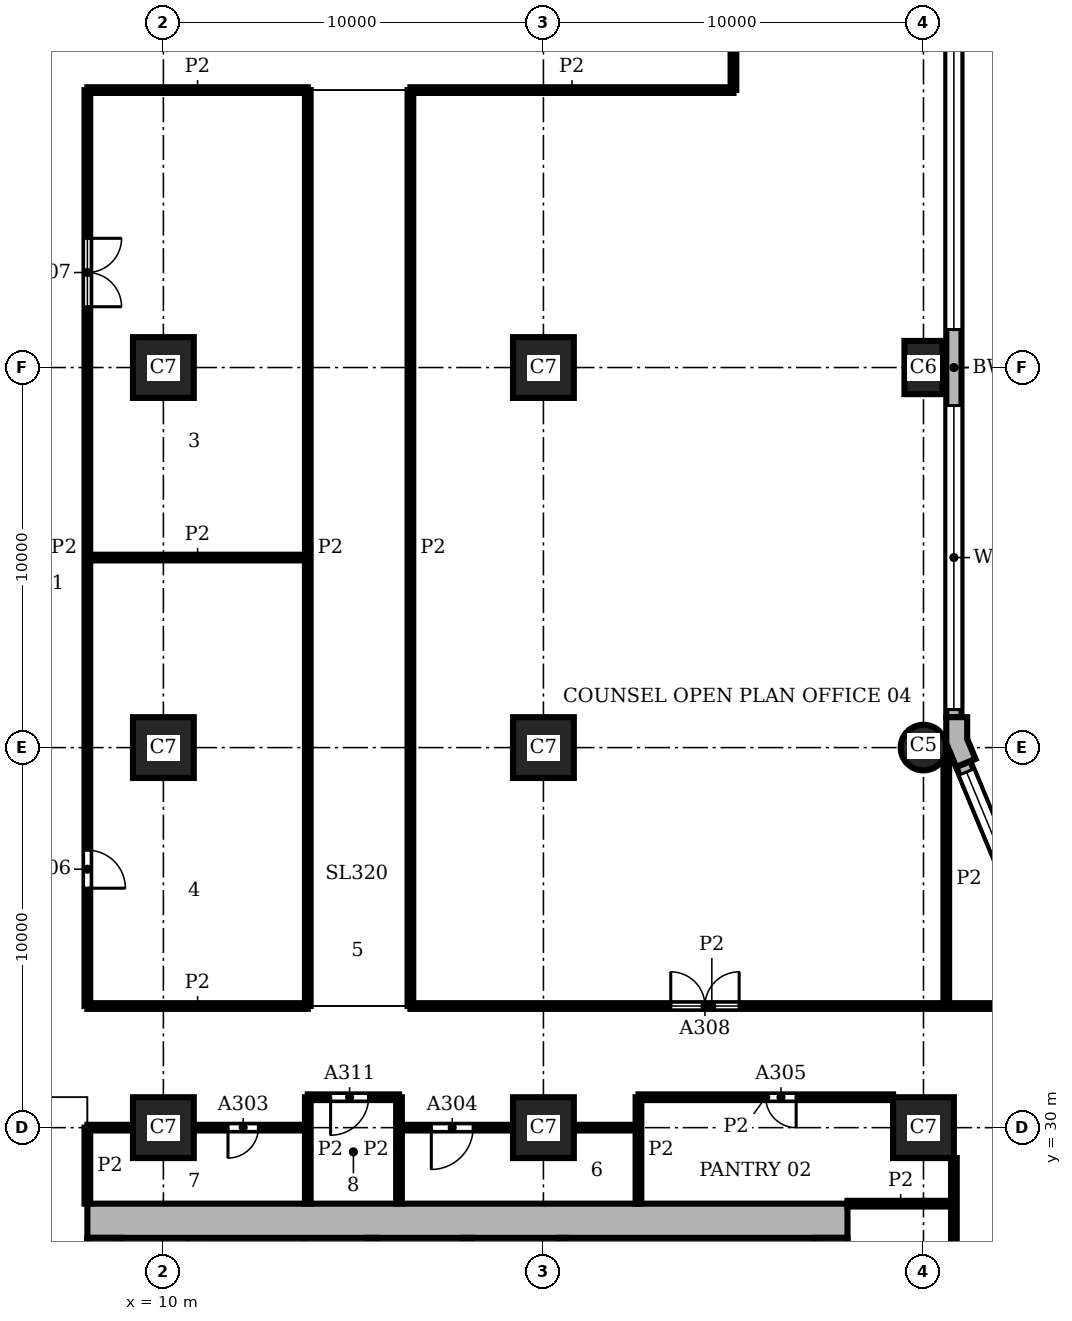
"""IFC4 building model, lengths in metres.
Left out: names, types, materials, properties, quantities, classifications, styles, units other than length and angle.
Written with IfcOpenShell. Run it as: python <this file> out.ifc"""

import sys

from ifc_helpers import new_model, si_unit, direction, frame, frame_2d, origin, origin_2d, place, context, subcontext, project, spatial, polyline, rectangle, circle, outline, extrude, element, fill, save


model = new_model("IFC4")
c1 = context("Model", 3, precision=1e-05, world=origin(), true_north=direction((0.0, 1.0)))
c2 = subcontext(c1, "Body", "Model", "MODEL_VIEW")
j1 = project(units=[si_unit("LENGTHUNIT", "METRE"), si_unit("PLANEANGLEUNIT", "RADIAN")], contexts=[c1])
p1 = place(None, origin())
s1 = spatial("IfcSite", under=j1, at=p1, CompositionType="ELEMENT")
p2 = place(p1, origin())
s2 = spatial("IfcBuilding", under=s1, at=p2, CompositionType="ELEMENT")
p3 = place(p2, frame((0.0, 0.0, 43.2)))
s3 = spatial("IfcBuildingStorey", under=s2, at=p3, CompositionType="ELEMENT", Elevation=43.2)
p4 = place(p3, frame((30.0, 40.0, 0.0), z_axis=(0.0, 0.0, 1.0), x_axis=(1.0, 0.0, 0.0)))
e1 = element("IfcColumn", 1, at=p4, inside=s3, PredefinedType="COLUMN", context=c2, shape_type="SweptSolid", body=[
    extrude(circle(Radius=0.6, at=origin_2d()), origin(), (0.0, 0.0, 1.0), 3.9),
])
p5 = place(p3, frame((30.0, 50.0, 0.0), z_axis=(0.0, 0.0, 1.0), x_axis=(0.0, 1.0, 0.0)))
e2 = element("IfcColumn", 2, at=p5, inside=s3, PredefinedType="COLUMN", context=c2, shape_type="SweptSolid", body=[
    extrude(rectangle(XDim=1.4, YDim=1.0, at=origin_2d()), origin(), (0.0, 0.0, 1.0), 3.9),
])
for number, where, z_axis, x_axis in (
    (3, (10.0, 30.0, 0.0), (0.0, 0.0, 1.0), (1.0, 0.0, 0.0)),
    (4, (10.0, 40.0, 0.0), (0.0, 0.0, 1.0), (1.0, 0.0, 0.0)),
    (5, (10.0, 50.0, 0.0), (0.0, 0.0, 1.0), (1.0, 0.0, 0.0)),
    (6, (20.0, 30.0, 0.0), (0.0, 0.0, 1.0), (1.0, 0.0, 0.0)),
    (7, (20.0, 40.0, 0.0), (0.0, 0.0, 1.0), (1.0, 0.0, 0.0)),
    (8, (20.0, 50.0, 0.0), (0.0, 0.0, 1.0), (1.0, 0.0, 0.0)),
    (9, (30.0, 30.0, 0.0), (0.0, 0.0, 1.0), (1.0, 0.0, 0.0)),
):
    element("IfcColumn", number, at=place(p3, frame(where, z_axis=z_axis, x_axis=x_axis)), inside=s3, PredefinedType="COLUMN", context=c2, shape_type="SweptSolid", body=[
        extrude(rectangle(XDim=1.6, YDim=1.6, at=origin_2d()), origin(), (0.0, 0.0, 1.0), 3.9),
    ])
p6 = place(p3, frame((27.55, 8.9, 0.0), z_axis=(0.0, 0.0, 1.0), x_axis=(0.0, 1.0, 0.0)))
e10 = element("IfcWall", 10, at=p6, inside=s3, PredefinedType="SHEAR", context=c2, shape_type="SweptSolid", body=[
    extrude(rectangle(XDim=18.2, YDim=0.9, at=frame_2d((9.1, 0.0))), origin(), (0.0, 0.0, 1.0), 3.9),
])
p7 = place(p6, frame((4.55, 0.0, 0.0)))
e11 = element("IfcOpeningElement", 11, at=p7, cuts=e10, PredefinedType="OPENING", context=c2, shape_type="SweptSolid", body=[
    extrude(rectangle(XDim=1.6, YDim=2.1, at=frame_2d((0.8, 1.05))), frame((0.0, 0.46, 0.0), z_axis=(0.0, -1.0, 0.0), x_axis=(1.0, 0.0, 0.0)), (0.0, 0.0, 1.0), 0.92),
])
p8 = place(p3, frame((28.0, 27.55, 0.0), z_axis=(0.0, 0.0, 1.0), x_axis=(-1.0, 0.0, 0.0)))
e12 = element("IfcWall", 12, at=p8, inside=s3, PredefinedType="SHEAR", context=c2, shape_type="SweptSolid", body=[
    extrude(rectangle(XDim=20.0, YDim=0.9, at=frame_2d((10.0, 0.0))), origin(), (0.0, 0.0, 1.0), 3.9),
])
p9 = place(p3, frame((8.45, 27.1, 0.0), z_axis=(0.0, 0.0, 1.0), x_axis=(0.0, -1.0, 0.0)))
e13 = element("IfcWall", 13, at=p9, inside=s3, PredefinedType="SHEAR", context=c2, shape_type="SweptSolid", body=[
    extrude(rectangle(XDim=18.2, YDim=0.9, at=frame_2d((9.1, 0.0))), origin(), (0.0, 0.0, 1.0), 3.9),
])
p10 = place(p3, origin())
e14 = element("IfcWall", 14, at=p10, inside=s3, PredefinedType="SOLIDWALL", context=c2, shape_type="SweptSolid", body=[
    extrude(outline(polyline([(31.23, 39.644), (31.369, 39.701), (31.15, 40.229), (31.15, 40.8), (31.0, 40.8), (30.6, 40.8), (30.6, 40.119), (30.861, 39.49), (31.23, 39.644)])), origin(), (0.0, 0.0, 1.0), 3.9),
])
p11 = place(p3, frame((33.362, 33.974, 0.0), z_axis=(0.0, 0.0, 1.0), x_axis=(-0.382655745237, 0.923891000409, 0.0)))
e15 = element("IfcWall", 15, at=p11, inside=s3, PredefinedType="SOLIDWALL", context=c2, shape_type="SweptSolid", body=[
    extrude(rectangle(XDim=6.053, YDim=0.4, at=frame_2d((3.027, 0.0))), origin(), (0.0, 0.0, 1.0), 3.9),
])
p12 = place(p11, frame((0.227, 0.0, 0.9)))
e16 = element("IfcOpeningElement", 16, at=p12, cuts=e15, PredefinedType="OPENING", context=c2, shape_type="SweptSolid", body=[
    extrude(rectangle(XDim=5.6, YDim=2.35, at=frame_2d((2.8, 1.175))), frame((0.0, 0.21, 0.0), z_axis=(0.0, -1.0, 0.0), x_axis=(1.0, 0.0, 0.0)), (0.0, 0.0, 1.0), 0.42),
])
p13 = place(p3, frame((30.8, 40.8, 0.0), z_axis=(0.0, 0.0, 1.0), x_axis=(0.0, 1.0, 0.0)))
e17 = element("IfcWall", 17, at=p13, inside=s3, PredefinedType="SOLIDWALL", context=c2, shape_type="SweptSolid", body=[
    extrude(rectangle(XDim=18.4, YDim=0.4, at=frame_2d((9.2, 0.0))), origin(), (0.0, 0.0, 1.0), 3.9),
])
p14 = place(p13, frame((0.2, 0.0, 0.9)))
e18 = element("IfcOpeningElement", 18, at=p14, cuts=e17, PredefinedType="OPENING", context=c2, shape_type="SweptSolid", body=[
    extrude(rectangle(XDim=8.0, YDim=2.35, at=frame_2d((4.0, 1.175))), frame((0.0, 0.21, 0.0), z_axis=(0.0, -1.0, 0.0), x_axis=(1.0, 0.0, 0.0)), (0.0, 0.0, 1.0), 0.42),
])
p15 = place(p13, frame((10.2, 0.0, 0.9)))
e19 = element("IfcOpeningElement", 19, at=p15, cuts=e17, PredefinedType="OPENING", context=c2, shape_type="SweptSolid", body=[
    extrude(rectangle(XDim=8.0, YDim=2.35, at=frame_2d((4.0, 1.175))), frame((0.0, 0.21, 0.0), z_axis=(0.0, -1.0, 0.0), x_axis=(1.0, 0.0, 0.0)), (0.0, 0.0, 1.0), 0.42),
])
p16 = place(p3, frame((15.5, 23.6, 0.0), z_axis=(0.0, 0.0, 1.0), x_axis=(0.0, 1.0, 0.0)))
e20 = element("IfcWall", 20, at=p16, inside=s3, PredefinedType="SHEAR", context=c2, shape_type="SweptSolid", body=[
    extrude(rectangle(XDim=3.5, YDim=0.2, at=frame_2d((1.75, 0.0))), origin(), (0.0, 0.0, 1.0), 3.58),
])
p17 = place(p3, frame((18.0, 20.0, 0.0), z_axis=(0.0, 0.0, 1.0), x_axis=(0.0, 1.0, 0.0)))
e21 = element("IfcWall", 21, at=p17, inside=s3, PredefinedType="SHEAR", context=c2, shape_type="SweptSolid", body=[
    extrude(rectangle(XDim=7.1, YDim=0.2, at=frame_2d((3.55, 0.0))), origin(), (0.0, 0.0, 1.0), 3.58),
])
p18 = place(p17, frame((1.2, 0.0, 0.0)))
e22 = element("IfcOpeningElement", 22, at=p18, cuts=e21, PredefinedType="OPENING", context=c2, shape_type="SweptSolid", body=[
    extrude(rectangle(XDim=1.2, YDim=2.1, at=frame_2d((0.6, 1.05))), frame((0.0, 0.11, 0.0), z_axis=(0.0, -1.0, 0.0), x_axis=(1.0, 0.0, 0.0)), (0.0, 0.0, 1.0), 0.22),
])
p19 = place(p3, frame((20.5, 23.6, 0.0), z_axis=(0.0, 0.0, 1.0), x_axis=(0.0, 1.0, 0.0)))
e23 = element("IfcWall", 23, at=p19, inside=s3, PredefinedType="SHEAR", context=c2, shape_type="SweptSolid", body=[
    extrude(rectangle(XDim=3.5, YDim=0.2, at=frame_2d((1.75, 0.0))), origin(), (0.0, 0.0, 1.0), 3.58),
])
p20 = place(p3, frame((8.0, 28.0, 0.0), z_axis=(0.0, 0.0, 1.0), x_axis=(0.0, 1.0, 0.0)))
e24 = element("IfcWall", 24, at=p20, inside=s3, PredefinedType="PARTITIONING", context=c2, shape_type="SweptSolid", body=[
    extrude(rectangle(XDim=2.0, YDim=0.15, at=frame_2d((1.0, 0.0))), origin(), (0.0, 0.0, 1.0), 3.58),
])
p21 = place(p3, frame((8.0, 33.2, 0.0), z_axis=(0.0, 0.0, 1.0), x_axis=(0.0, 1.0, 0.0)))
e25 = element("IfcWall", 25, at=p21, inside=s3, PredefinedType="PARTITIONING", context=c2, shape_type="SweptSolid", body=[
    extrude(rectangle(XDim=24.1, YDim=0.15, at=frame_2d((12.05, 0.0))), origin(), (0.0, 0.0, 1.0), 3.58),
])
p22 = place(p21, frame((3.1, 0.0, 0.0)))
e26 = element("IfcOpeningElement", 26, at=p22, cuts=e25, PredefinedType="OPENING", context=c2, shape_type="SweptSolid", body=[
    extrude(rectangle(XDim=1.0, YDim=2.1, at=frame_2d((0.5, 1.05))), frame((0.0, 0.085, 0.0), z_axis=(0.0, -1.0, 0.0), x_axis=(1.0, 0.0, 0.0)), (0.0, 0.0, 1.0), 0.17),
])
p23 = place(p21, frame((18.4, 0.0, 0.0)))
e27 = element("IfcOpeningElement", 27, at=p23, cuts=e25, PredefinedType="OPENING", context=c2, shape_type="SweptSolid", body=[
    extrude(rectangle(XDim=1.8, YDim=2.1, at=frame_2d((0.9, 1.05))), frame((0.0, 0.085, 0.0), z_axis=(0.0, -1.0, 0.0), x_axis=(1.0, 0.0, 0.0)), (0.0, 0.0, 1.0), 0.17),
])
p24 = place(p3, frame((13.8, 28.0, 0.0), z_axis=(0.0, 0.0, 1.0), x_axis=(0.0, 1.0, 0.0)))
e28 = element("IfcWall", 28, at=p24, inside=s3, PredefinedType="PARTITIONING", context=c2, shape_type="SweptSolid", body=[
    extrude(rectangle(XDim=2.8, YDim=0.15, at=frame_2d((1.4, 0.0))), origin(), (0.0, 0.0, 1.0), 3.58),
])
p25 = place(p3, frame((13.8, 33.2, 0.0), z_axis=(0.0, 0.0, 1.0), x_axis=(0.0, 1.0, 0.0)))
e29 = element("IfcWall", 29, at=p25, inside=s3, PredefinedType="PARTITIONING", context=c2, shape_type="SweptSolid", body=[
    extrude(rectangle(XDim=24.1, YDim=0.15, at=frame_2d((12.05, 0.0))), origin(), (0.0, 0.0, 1.0), 3.58),
])
p26 = place(p3, frame((16.2, 28.0, 0.0), z_axis=(0.0, 0.0, 1.0), x_axis=(0.0, 1.0, 0.0)))
e30 = element("IfcWall", 30, at=p26, inside=s3, PredefinedType="PARTITIONING", context=c2, shape_type="SweptSolid", body=[
    extrude(rectangle(XDim=2.8, YDim=0.15, at=frame_2d((1.4, 0.0))), origin(), (0.0, 0.0, 1.0), 3.58),
])
p27 = place(p3, frame((16.5, 33.2, 0.0), z_axis=(0.0, 0.0, 1.0), x_axis=(0.0, 1.0, 0.0)))
e31 = element("IfcWall", 31, at=p27, inside=s3, PredefinedType="PARTITIONING", context=c2, shape_type="SweptSolid", body=[
    extrude(rectangle(XDim=24.1, YDim=0.15, at=frame_2d((12.05, 0.0))), origin(), (0.0, 0.0, 1.0), 3.58),
])
p28 = place(p3, frame((22.5, 28.0, 0.0), z_axis=(0.0, 0.0, 1.0), x_axis=(0.0, 1.0, 0.0)))
e32 = element("IfcWall", 32, at=p28, inside=s3, PredefinedType="PARTITIONING", context=c2, shape_type="SweptSolid", body=[
    extrude(rectangle(XDim=2.8, YDim=0.15, at=frame_2d((1.4, 0.0))), origin(), (0.0, 0.0, 1.0), 3.58),
])
p29 = place(p3, frame((25.0, 57.3, 0.0), z_axis=(0.0, 0.0, 1.0), x_axis=(0.0, 1.0, 0.0)))
e33 = element("IfcWall", 33, at=p29, inside=s3, PredefinedType="PARTITIONING", context=c2, shape_type="SweptSolid", body=[
    extrude(rectangle(XDim=2.7, YDim=0.15, at=frame_2d((1.35, 0.0))), origin(), (0.0, 0.0, 1.0), 3.58),
])
p30 = place(p3, frame((30.6, 33.2, 0.0), z_axis=(0.0, 0.0, 1.0), x_axis=(0.0, 1.0, 0.0)))
e34 = element("IfcWall", 34, at=p30, inside=s3, PredefinedType="PARTITIONING", context=c2, shape_type="SweptSolid", body=[
    extrude(rectangle(XDim=6.699, YDim=0.15, at=frame_2d((3.35, 0.0))), origin(), (0.0, 0.0, 1.0), 3.58),
])
p31 = place(p3, frame((30.8, 20.8, 0.0), z_axis=(0.0, 0.0, 1.0), x_axis=(0.0, 1.0, 0.0)))
e35 = element("IfcWall", 35, at=p31, inside=s3, PredefinedType="PARTITIONING", context=c2, shape_type="SweptSolid", body=[
    extrude(rectangle(XDim=8.4, YDim=0.15, at=frame_2d((4.2, 0.0))), origin(), (0.0, 0.0, 1.0), 3.58),
])
p32 = place(p31, frame((3.3, 0.0, 0.0)))
e36 = element("IfcOpeningElement", 36, at=p32, cuts=e35, PredefinedType="OPENING", context=c2, shape_type="SweptSolid", body=[
    extrude(rectangle(XDim=1.1, YDim=2.1, at=frame_2d((0.55, 1.05))), frame((0.0, 0.085, 0.0), z_axis=(0.0, -1.0, 0.0), x_axis=(1.0, 0.0, 0.0)), (0.0, 0.0, 1.0), 0.17),
])
p33 = place(p3, frame((28.0, 28.0, 0.0), z_axis=(0.0, 0.0, 1.0), x_axis=(1.0, 0.0, 0.0)))
e37 = element("IfcWall", 37, at=p33, inside=s3, PredefinedType="PARTITIONING", context=c2, shape_type="SweptSolid", body=[
    extrude(rectangle(XDim=2.8, YDim=0.15, at=frame_2d((1.4, 0.0))), origin(), (0.0, 0.0, 1.0), 3.58),
])
p34 = place(p3, frame((8.0, 30.0, 0.0), z_axis=(0.0, 0.0, 1.0), x_axis=(1.0, 0.0, 0.0)))
e38 = element("IfcWall", 38, at=p34, inside=s3, PredefinedType="PARTITIONING", context=c2, shape_type="SweptSolid", body=[
    extrude(rectangle(XDim=1.2, YDim=0.15, at=frame_2d((0.6, 0.0))), origin(), (0.0, 0.0, 1.0), 3.58),
])
p35 = place(p3, frame((10.8, 30.0, 0.0), z_axis=(0.0, 0.0, 1.0), x_axis=(1.0, 0.0, 0.0)))
e39 = element("IfcWall", 39, at=p35, inside=s3, PredefinedType="PARTITIONING", context=c2, shape_type="SweptSolid", body=[
    extrude(rectangle(XDim=3.0, YDim=0.15, at=frame_2d((1.5, 0.0))), origin(), (0.0, 0.0, 1.0), 3.58),
])
p36 = place(p35, frame((0.9, 0.0, 0.0)))
e40 = element("IfcOpeningElement", 40, at=p36, cuts=e39, PredefinedType="OPENING", context=c2, shape_type="SweptSolid", body=[
    extrude(rectangle(XDim=0.8, YDim=2.1, at=frame_2d((0.4, 1.05))), frame((0.0, 0.085, 0.0), z_axis=(0.0, -1.0, 0.0), x_axis=(1.0, 0.0, 0.0)), (0.0, 0.0, 1.0), 0.17),
])
p37 = place(p3, frame((16.2, 30.0, 0.0), z_axis=(0.0, 0.0, 1.0), x_axis=(1.0, 0.0, 0.0)))
e41 = element("IfcWall", 41, at=p37, inside=s3, PredefinedType="PARTITIONING", context=c2, shape_type="SweptSolid", body=[
    extrude(rectangle(XDim=3.0, YDim=0.15, at=frame_2d((1.5, 0.0))), origin(), (0.0, 0.0, 1.0), 3.58),
])
p38 = place(p37, frame((0.85, 0.0, 0.0)))
e42 = element("IfcOpeningElement", 42, at=p38, cuts=e41, PredefinedType="OPENING", context=c2, shape_type="SweptSolid", body=[
    extrude(rectangle(XDim=1.1, YDim=2.1, at=frame_2d((0.55, 1.05))), frame((0.0, 0.085, 0.0), z_axis=(0.0, -1.0, 0.0), x_axis=(1.0, 0.0, 0.0)), (0.0, 0.0, 1.0), 0.17),
])
p39 = place(p3, frame((20.8, 30.0, 0.0), z_axis=(0.0, 0.0, 1.0), x_axis=(1.0, 0.0, 0.0)))
e43 = element("IfcWall", 43, at=p39, inside=s3, PredefinedType="PARTITIONING", context=c2, shape_type="SweptSolid", body=[
    extrude(rectangle(XDim=1.7, YDim=0.15, at=frame_2d((0.85, 0.0))), origin(), (0.0, 0.0, 1.0), 3.58),
])
p40 = place(p3, frame((13.8, 30.8, 0.0), z_axis=(0.0, 0.0, 1.0), x_axis=(1.0, 0.0, 0.0)))
e44 = element("IfcWall", 44, at=p40, inside=s3, PredefinedType="PARTITIONING", context=c2, shape_type="SweptSolid", body=[
    extrude(rectangle(XDim=2.4, YDim=0.15, at=frame_2d((1.2, 0.0))), origin(), (0.0, 0.0, 1.0), 3.58),
])
p41 = place(p40, frame((0.6, 0.0, 0.0)))
e45 = element("IfcOpeningElement", 45, at=p41, cuts=e44, PredefinedType="OPENING", context=c2, shape_type="SweptSolid", body=[
    extrude(rectangle(XDim=1.0, YDim=2.1, at=frame_2d((0.5, 1.05))), frame((0.0, 0.085, 0.0), z_axis=(0.0, -1.0, 0.0), x_axis=(1.0, 0.0, 0.0)), (0.0, 0.0, 1.0), 0.17),
])
p42 = place(p3, frame((22.5, 30.8, 0.0), z_axis=(0.0, 0.0, 1.0), x_axis=(1.0, 0.0, 0.0)))
e46 = element("IfcWall", 46, at=p42, inside=s3, PredefinedType="PARTITIONING", context=c2, shape_type="SweptSolid", body=[
    extrude(rectangle(XDim=6.7, YDim=0.15, at=frame_2d((3.35, 0.0))), origin(), (0.0, 0.0, 1.0), 3.58),
])
p43 = place(p42, frame((3.35, 0.0, 0.0)))
e47 = element("IfcOpeningElement", 47, at=p43, cuts=e46, PredefinedType="OPENING", context=c2, shape_type="SweptSolid", body=[
    extrude(rectangle(XDim=0.8, YDim=2.1, at=frame_2d((0.4, 1.05))), frame((0.0, 0.085, 0.0), z_axis=(0.0, -1.0, 0.0), x_axis=(1.0, 0.0, 0.0)), (0.0, 0.0, 1.0), 0.17),
])
p44 = place(p3, frame((8.0, 33.2, 0.0), z_axis=(0.0, 0.0, 1.0), x_axis=(1.0, 0.0, 0.0)))
e48 = element("IfcWall", 48, at=p44, inside=s3, PredefinedType="PARTITIONING", context=c2, shape_type="SweptSolid", body=[
    extrude(rectangle(XDim=5.8, YDim=0.15, at=frame_2d((2.9, 0.0))), origin(), (0.0, 0.0, 1.0), 3.58),
])
p45 = place(p3, frame((16.5, 33.2, 0.0), z_axis=(0.0, 0.0, 1.0), x_axis=(1.0, 0.0, 0.0)))
e49 = element("IfcWall", 49, at=p45, inside=s3, PredefinedType="PARTITIONING", context=c2, shape_type="SweptSolid", body=[
    extrude(rectangle(XDim=15.862, YDim=0.15, at=frame_2d((7.931, 0.0))), origin(), (0.0, 0.0, 1.0), 3.58),
])
p46 = place(p45, frame((6.85, 0.0, 0.0)))
e50 = element("IfcOpeningElement", 50, at=p46, cuts=e49, PredefinedType="OPENING", context=c2, shape_type="SweptSolid", body=[
    extrude(rectangle(XDim=1.8, YDim=2.1, at=frame_2d((0.9, 1.05))), frame((0.0, 0.085, 0.0), z_axis=(0.0, -1.0, 0.0), x_axis=(1.0, 0.0, 0.0)), (0.0, 0.0, 1.0), 0.17),
])
for number, where, z_axis, x_axis in (
    (51, (8.0, 45.0, 0.0), (0.0, 0.0, 1.0), (1.0, 0.0, 0.0)),
    (52, (8.0, 57.3, 0.0), (0.0, 0.0, 1.0), (1.0, 0.0, 0.0)),
):
    element("IfcWall", number, at=place(p3, frame(where, z_axis=z_axis, x_axis=x_axis)), inside=s3, PredefinedType="PARTITIONING", context=c2, shape_type="SweptSolid", body=[
        extrude(rectangle(XDim=5.8, YDim=0.15, at=frame_2d((2.9, 0.0))), origin(), (0.0, 0.0, 1.0), 3.58),
    ])
p47 = place(p3, frame((16.5, 57.3, 0.0), z_axis=(0.0, 0.0, 1.0), x_axis=(1.0, 0.0, 0.0)))
e53 = element("IfcWall", 53, at=p47, inside=s3, PredefinedType="PARTITIONING", context=c2, shape_type="SweptSolid", body=[
    extrude(rectangle(XDim=8.5, YDim=0.15, at=frame_2d((4.25, 0.0))), origin(), (0.0, 0.0, 1.0), 3.58),
])
p48 = place(p12, origin())
e54 = element("IfcWindow", 54, at=p48, inside=s3, PartitioningType="SINGLE_PANEL", PredefinedType="WINDOW", context=c2, shape_type="SweptSolid", body=[
    extrude(rectangle(XDim=5.6, YDim=2.35, at=frame_2d((2.8, 1.175))), frame((0.0, 0.16, 0.0), z_axis=(0.0, -1.0, 0.0), x_axis=(1.0, 0.0, 0.0)), (0.0, 0.0, 1.0), 0.06),
])
fill(e16, e54)
p49 = place(p14, origin())
e55 = element("IfcWindow", 55, at=p49, inside=s3, PartitioningType="SINGLE_PANEL", PredefinedType="WINDOW", context=c2, shape_type="SweptSolid", body=[
    extrude(rectangle(XDim=8.0, YDim=2.35, at=frame_2d((4.0, 1.175))), frame((0.0, 0.16, 0.0), z_axis=(0.0, -1.0, 0.0), x_axis=(1.0, 0.0, 0.0)), (0.0, 0.0, 1.0), 0.06),
])
fill(e18, e55)
p50 = place(p15, origin())
e56 = element("IfcWindow", 56, at=p50, inside=s3, PartitioningType="SINGLE_PANEL", PredefinedType="WINDOW", context=c2, shape_type="SweptSolid", body=[
    extrude(rectangle(XDim=8.0, YDim=2.35, at=frame_2d((4.0, 1.175))), frame((0.0, 0.16, 0.0), z_axis=(0.0, -1.0, 0.0), x_axis=(1.0, 0.0, 0.0)), (0.0, 0.0, 1.0), 0.06),
])
fill(e19, e56)
p51 = place(p36, frame((0.8, 0.0, 0.0), z_axis=(0.0, 0.0, 1.0), x_axis=(-1.0, 0.0, 0.0)))
e57 = element("IfcDoor", 57, at=p51, inside=s3, OperationType="SINGLE_SWING_RIGHT", PredefinedType="DOOR", context=c2, shape_type="SweptSolid", body=[
    extrude(rectangle(XDim=0.8, YDim=2.1, at=frame_2d((0.4, 1.05))), frame((0.0, 0.025, 0.0), z_axis=(0.0, -1.0, 0.0), x_axis=(1.0, 0.0, 0.0)), (0.0, 0.0, 1.0), 0.05),
])
fill(e40, e57)
p52 = place(p38, frame((1.1, 0.0, 0.0), z_axis=(0.0, 0.0, 1.0), x_axis=(-1.0, 0.0, 0.0)))
e58 = element("IfcDoor", 58, at=p52, inside=s3, OperationType="SINGLE_SWING_RIGHT", PredefinedType="DOOR", context=c2, shape_type="SweptSolid", body=[
    extrude(rectangle(XDim=1.1, YDim=2.1, at=frame_2d((0.55, 1.05))), frame((0.0, 0.025, 0.0), z_axis=(0.0, -1.0, 0.0), x_axis=(1.0, 0.0, 0.0)), (0.0, 0.0, 1.0), 0.05),
])
fill(e42, e58)
p53 = place(p43, frame((0.8, 0.0, 0.0), z_axis=(0.0, 0.0, 1.0), x_axis=(-1.0, 0.0, 0.0)))
e59 = element("IfcDoor", 59, at=p53, inside=s3, OperationType="SINGLE_SWING_LEFT", PredefinedType="DOOR", context=c2, shape_type="SweptSolid", body=[
    extrude(rectangle(XDim=0.8, YDim=2.1, at=frame_2d((0.4, 1.05))), frame((0.0, 0.025, 0.0), z_axis=(0.0, -1.0, 0.0), x_axis=(1.0, 0.0, 0.0)), (0.0, 0.0, 1.0), 0.05),
])
fill(e47, e59)
p54 = place(p22, frame((1.0, 0.0, 0.0), z_axis=(0.0, 0.0, 1.0), x_axis=(-1.0, 0.0, 0.0)))
e60 = element("IfcDoor", 60, at=p54, inside=s3, OperationType="SINGLE_SWING_RIGHT", PredefinedType="DOOR", context=c2, shape_type="SweptSolid", body=[
    extrude(rectangle(XDim=1.0, YDim=2.1, at=frame_2d((0.5, 1.05))), frame((0.0, 0.025, 0.0), z_axis=(0.0, -1.0, 0.0), x_axis=(1.0, 0.0, 0.0)), (0.0, 0.0, 1.0), 0.05),
])
fill(e26, e60)
p55 = place(p23, frame((1.8, 0.0, 0.0), z_axis=(0.0, 0.0, 1.0), x_axis=(-1.0, 0.0, 0.0)))
e61 = element("IfcDoor", 61, at=p55, inside=s3, OperationType="DOUBLE_DOOR_SINGLE_SWING", PredefinedType="DOOR", context=c2, shape_type="SweptSolid", body=[
    extrude(rectangle(XDim=1.8, YDim=2.1, at=frame_2d((0.9, 1.05))), frame((0.0, 0.025, 0.0), z_axis=(0.0, -1.0, 0.0), x_axis=(1.0, 0.0, 0.0)), (0.0, 0.0, 1.0), 0.05),
])
fill(e27, e61)
p56 = place(p46, origin())
e62 = element("IfcDoor", 62, at=p56, inside=s3, OperationType="DOUBLE_DOOR_SINGLE_SWING", PredefinedType="DOOR", context=c2, shape_type="SweptSolid", body=[
    extrude(rectangle(XDim=1.8, YDim=2.1, at=frame_2d((0.9, 1.05))), frame((0.0, 0.025, 0.0), z_axis=(0.0, -1.0, 0.0), x_axis=(1.0, 0.0, 0.0)), (0.0, 0.0, 1.0), 0.05),
])
fill(e50, e62)
p57 = place(p41, frame((1.0, 0.0, 0.0), z_axis=(0.0, 0.0, 1.0), x_axis=(-1.0, 0.0, 0.0)))
e63 = element("IfcDoor", 63, at=p57, inside=s3, OperationType="SINGLE_SWING_RIGHT", PredefinedType="DOOR", context=c2, shape_type="SweptSolid", body=[
    extrude(rectangle(XDim=1.0, YDim=2.1, at=frame_2d((0.5, 1.05))), frame((0.0, 0.025, 0.0), z_axis=(0.0, -1.0, 0.0), x_axis=(1.0, 0.0, 0.0)), (0.0, 0.0, 1.0), 0.05),
])
fill(e45, e63)
save(model, sys.argv[1])
